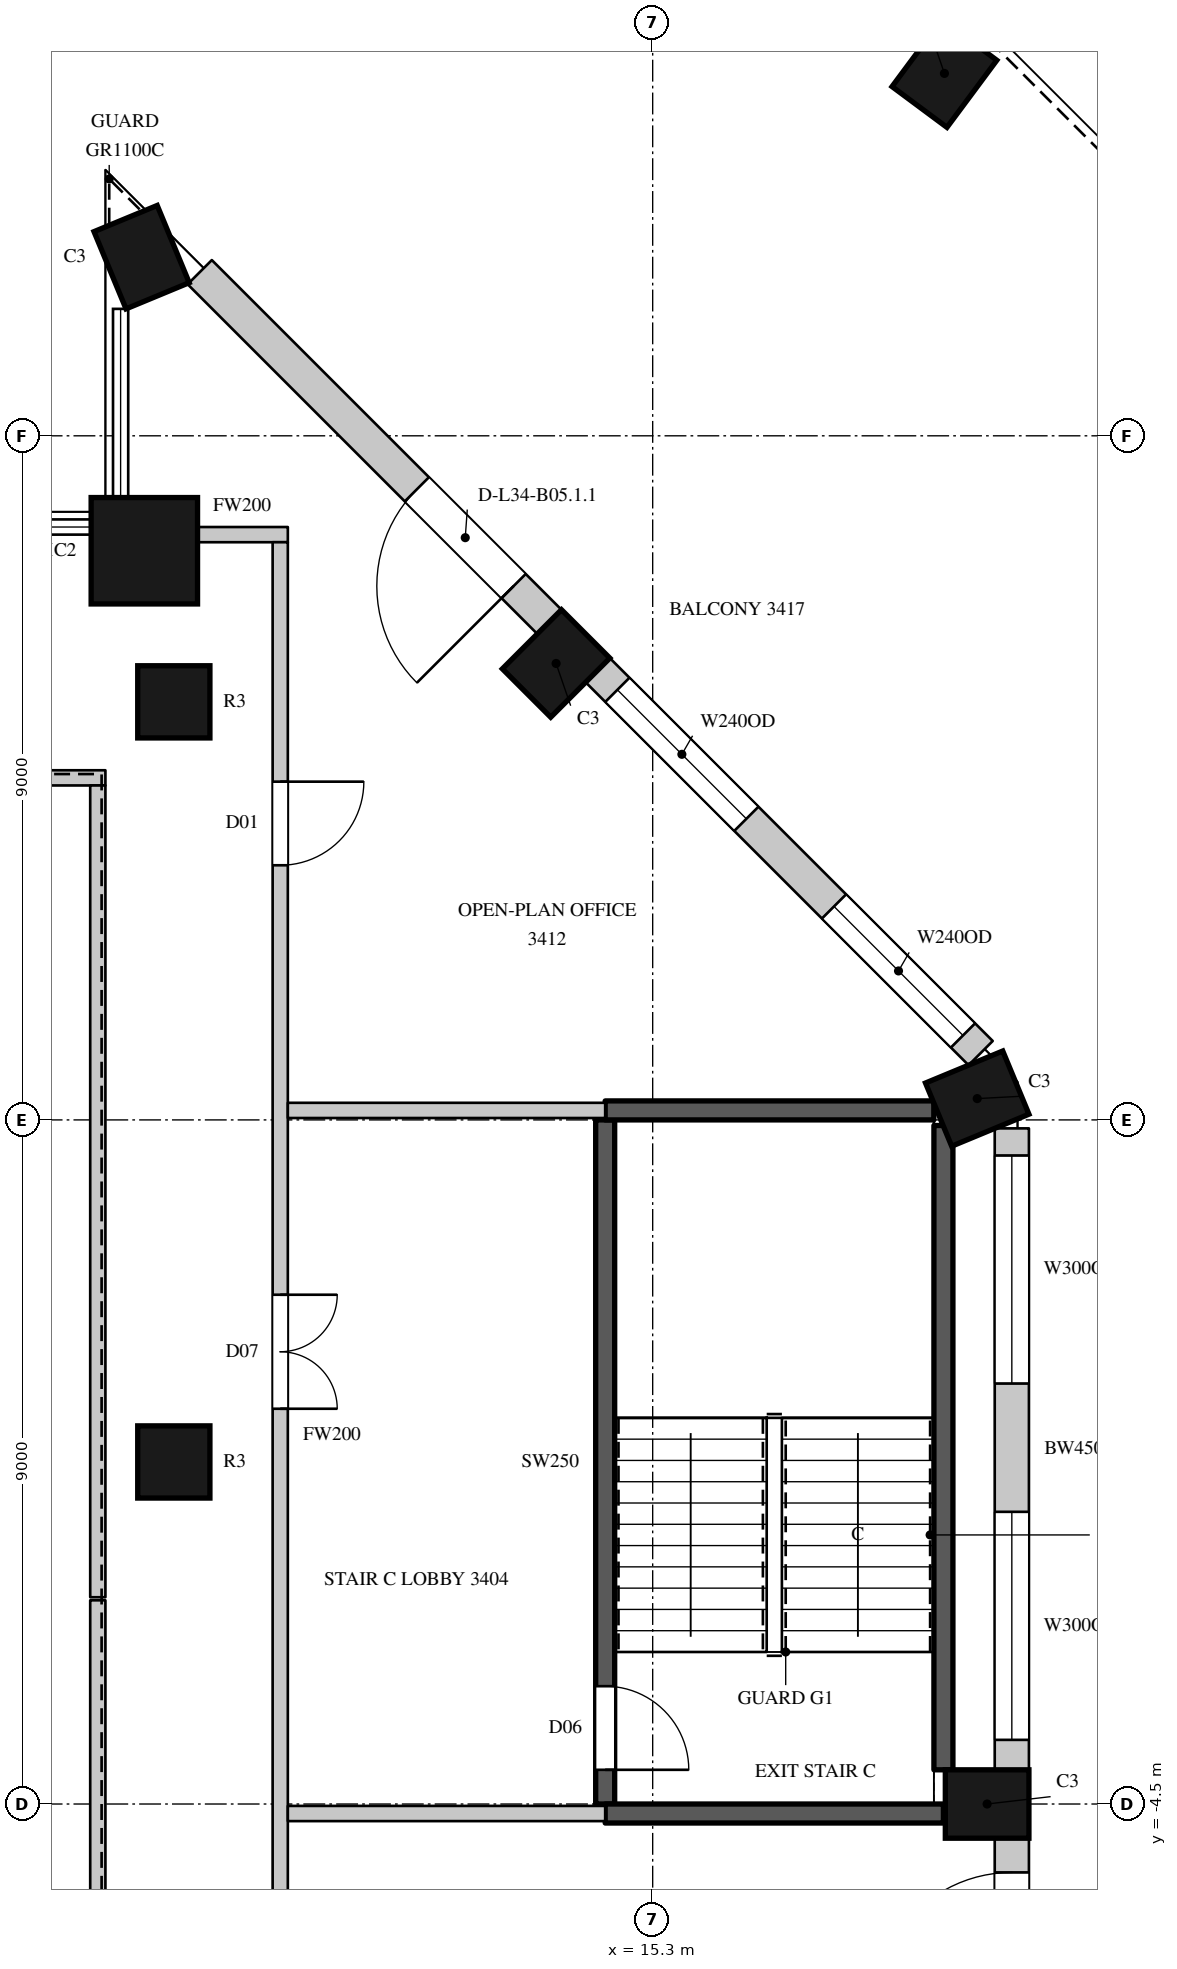
"""IFC4 building model, lengths in metres.
Left out: names, types, materials, properties, quantities, classifications, styles, units other than length and angle.
Written with IfcOpenShell. Run it as: python <this file> out.ifc"""

import sys

from ifc_helpers import new_model, si_unit, direction, frame, frame_2d, origin, origin_2d, place, context, subcontext, project, spatial, rectangle, circle, extrude, element, fill, save


model = new_model("IFC4")
c1 = context("Model", 3, precision=1e-05, world=origin(), true_north=direction((0.0, 1.0)))
c2 = subcontext(c1, "Body", "Model", "MODEL_VIEW")
j1 = project(units=[si_unit("LENGTHUNIT", "METRE"), si_unit("PLANEANGLEUNIT", "RADIAN")], contexts=[c1])
p1 = place(None, origin())
s1 = spatial("IfcSite", under=j1, at=p1, CompositionType="ELEMENT")
p2 = place(p1, origin())
s2 = spatial("IfcBuilding", under=s1, at=p2, CompositionType="ELEMENT")
p3 = place(p2, frame((0.0, 0.0, 160.5)))
s3 = spatial("IfcBuildingStorey", under=s2, at=p3, CompositionType="ELEMENT", Elevation=160.5)
for number, where, z_axis, x_axis in (
    (1, (19.7, -4.5, 0.0), (0.0, 0.0, 1.0), (0.0, 1.0, 0.0)),
    (2, (19.57, 4.78, 0.0), (0.0, 0.0, 1.0), (-0.383, 0.924, 0.0)),
    (3, (14.029, 10.505, 0.0), (0.0, 0.0, 1.0), (-0.707, 0.707, 0.0)),
    (4, (8.576, 15.85, 0.0), (0.0, 0.0, 1.0), (-0.924, -0.383, 0.0)),
):
    element("IfcColumn", number, at=place(p3, frame(where, z_axis=z_axis, x_axis=x_axis)), inside=s3, PredefinedType="COLUMN", context=c2, shape_type="SweptSolid", body=[
        extrude(rectangle(XDim=0.9, YDim=1.1, at=origin_2d()), origin(), (0.0, 0.0, 1.0), 4.1),
    ])
p4 = place(p3, frame((8.612, 11.988, 0.0), z_axis=(0.0, 0.0, 1.0), x_axis=(1.0, 0.0, 0.0)))
e5 = element("IfcColumn", 5, at=p4, inside=s3, PredefinedType="COLUMN", context=c2, shape_type="SweptSolid", body=[
    extrude(circle(Radius=0.7, at=origin_2d()), origin(), (0.0, 0.0, 1.0), 4.1),
])
p5 = place(p3, frame((19.138, 18.268, 0.0), z_axis=(0.0, 0.0, 1.0), x_axis=(-0.802798546114, 0.596250362144, 0.0)))
e6 = element("IfcColumn", 6, at=p5, inside=s3, PredefinedType="COLUMN", context=c2, shape_type="SweptSolid", body=[
    extrude(rectangle(XDim=0.9, YDim=1.1, at=origin_2d()), origin(), (0.0, 0.0, 1.0), 4.1),
])
for number, where, z_axis, x_axis in (
    (7, (9.0, 0.0, 0.0), (0.0, 0.0, 1.0), (1.0, 0.0, 0.0)),
    (8, (9.0, 10.0, 0.0), (0.0, 0.0, 1.0), (1.0, 0.0, 0.0)),
):
    element("IfcColumn", number, at=place(p3, frame(where, z_axis=z_axis, x_axis=x_axis)), inside=s3, PredefinedType="COLUMN", context=c2, shape_type="SweptSolid", body=[
        extrude(circle(Radius=0.475, at=origin_2d()), origin(), (0.0, 0.0, 1.0), 4.1),
    ])
p6 = place(p3, frame((20.025, -11.064, 0.0), z_axis=(0.0, 0.0, 1.0), x_axis=(0.0, 1.0, 0.0)))
e9 = element("IfcWall", 9, at=p6, inside=s3, PredefinedType="SOLIDWALL", context=c2, shape_type="SweptSolid", body=[
    extrude(rectangle(XDim=6.114, YDim=0.45, at=frame_2d((3.057, 0.0))), origin(), (0.0, 0.0, 1.0), 3.8),
])
p7 = place(p6, frame((3.864, 0.0, 0.0)))
e10 = element("IfcOpeningElement", 10, at=p7, cuts=e9, PredefinedType="OPENING", context=c2, shape_type="SweptSolid", body=[
    extrude(rectangle(XDim=1.8, YDim=2.4, at=frame_2d((0.9, 1.2))), frame((0.0, 0.235, 0.0), z_axis=(0.0, -1.0, 0.0), x_axis=(1.0, 0.0, 0.0)), (0.0, 0.0, 1.0), 0.47),
])
p8 = place(p3, frame((20.025, -4.05, 0.0), z_axis=(0.0, 0.0, 1.0), x_axis=(0.0, 1.0, 0.0)))
e11 = element("IfcWall", 11, at=p8, inside=s3, PredefinedType="SOLIDWALL", context=c2, shape_type="SweptSolid", body=[
    extrude(rectangle(XDim=8.439, YDim=0.45, at=frame_2d((4.219, 0.0))), origin(), (0.0, 0.0, 1.0), 3.8),
])
p9 = place(p8, frame((0.394, 0.0, 1.05)))
e12 = element("IfcOpeningElement", 12, at=p9, cuts=e11, PredefinedType="OPENING", context=c2, shape_type="SweptSolid", body=[
    extrude(rectangle(XDim=3.0, YDim=2.4, at=frame_2d((1.5, 1.2))), frame((0.0, 0.235, 0.0), z_axis=(0.0, -1.0, 0.0), x_axis=(1.0, 0.0, 0.0)), (0.0, 0.0, 1.0), 0.47),
])
p10 = place(p8, frame((5.082, 0.0, 1.05)))
e13 = element("IfcOpeningElement", 13, at=p10, cuts=e11, PredefinedType="OPENING", context=c2, shape_type="SweptSolid", body=[
    extrude(rectangle(XDim=3.0, YDim=2.4, at=frame_2d((1.5, 1.2))), frame((0.0, 0.235, 0.0), z_axis=(0.0, -1.0, 0.0), x_axis=(1.0, 0.0, 0.0)), (0.0, 0.0, 1.0), 0.47),
])
p11 = place(p3, frame((19.615, 5.379, 0.0), z_axis=(0.0, 0.0, 1.0), x_axis=(-0.707089646058, 0.7071239159, 0.0)))
e14 = element("IfcWall", 14, at=p11, inside=s3, PredefinedType="SOLIDWALL", context=c2, shape_type="SweptSolid", body=[
    extrude(rectangle(XDim=7.124, YDim=0.45, at=frame_2d((3.562, 0.0))), origin(), (0.0, 0.0, 1.0), 3.8),
])
p12 = place(p11, frame((0.328, 0.0, 1.05)))
e15 = element("IfcOpeningElement", 15, at=p12, cuts=e14, PredefinedType="OPENING", context=c2, shape_type="SweptSolid", body=[
    extrude(rectangle(XDim=2.4, YDim=2.4, at=frame_2d((1.2, 1.2))), frame((0.0, 0.235, 0.0), z_axis=(0.0, -1.0, 0.0), x_axis=(1.0, 0.0, 0.0)), (0.0, 0.0, 1.0), 0.47),
])
p13 = place(p11, frame((4.359, 0.0, 1.05)))
e16 = element("IfcOpeningElement", 16, at=p13, cuts=e14, PredefinedType="OPENING", context=c2, shape_type="SweptSolid", body=[
    extrude(rectangle(XDim=2.4, YDim=2.4, at=frame_2d((1.2, 1.2))), frame((0.0, 0.235, 0.0), z_axis=(0.0, -1.0, 0.0), x_axis=(1.0, 0.0, 0.0)), (0.0, 0.0, 1.0), 0.47),
])
p14 = place(p3, frame((13.941, 11.053, 0.0), z_axis=(0.0, 0.0, 1.0), x_axis=(-0.707106781187, 0.707106781187, 0.0)))
e17 = element("IfcWall", 17, at=p14, inside=s3, PredefinedType="SOLIDWALL", context=c2, shape_type="SweptSolid", body=[
    extrude(rectangle(XDim=6.505, YDim=0.45, at=frame_2d((3.252, 0.0))), origin(), (0.0, 0.0, 1.0), 3.8),
])
p15 = place(p14, frame((0.665, 0.0, 0.0)))
e18 = element("IfcOpeningElement", 18, at=p15, cuts=e17, PredefinedType="OPENING", context=c2, shape_type="SweptSolid", body=[
    extrude(rectangle(XDim=1.8, YDim=2.4, at=frame_2d((0.9, 1.2))), frame((0.0, 0.235, 0.0), z_axis=(0.0, -1.0, 0.0), x_axis=(1.0, 0.0, 0.0)), (0.0, 0.0, 1.0), 0.47),
])
p16 = place(p3, frame((21.1, -5.1, 0.0), z_axis=(0.0, 0.0, 1.0), x_axis=(0.0, 1.0, 0.0)))
e19 = element("IfcWall", 19, at=p16, inside=s3, PredefinedType="SOLIDWALL", context=c2, shape_type="SweptSolid", body=[
    extrude(rectangle(XDim=3.583, YDim=0.45, at=frame_2d((1.792, 0.0))), origin(), (0.0, 0.0, 1.0), 0.6),
])
p17 = place(p3, frame((21.1, -0.617, 0.0), z_axis=(0.0, 0.0, 1.0), x_axis=(0.0, 1.0, 0.0)))
e20 = element("IfcWall", 20, at=p17, inside=s3, PredefinedType="SOLIDWALL", context=c2, shape_type="SweptSolid", body=[
    extrude(rectangle(XDim=2.567, YDim=0.45, at=frame_2d((1.283, 0.0))), origin(), (0.0, 0.0, 1.0), 0.6),
])
p18 = place(p3, frame((18.65, 7.864, 0.0), z_axis=(0.0, 0.0, 1.0), x_axis=(-0.707059037574, 0.707154521576, 0.0)))
e21 = element("IfcWall", 21, at=p18, inside=s3, PredefinedType="SOLIDWALL", context=c2, shape_type="SweptSolid", body=[
    extrude(rectangle(XDim=2.557, YDim=0.45, at=frame_2d((1.278, 0.0))), origin(), (0.0, 0.0, 1.0), 0.6),
])
p19 = place(p3, frame((16.206, 10.308, 0.0), z_axis=(0.0, 0.0, 1.0), x_axis=(-0.707057827829, 0.707155731156, 0.0)))
e22 = element("IfcWall", 22, at=p19, inside=s3, PredefinedType="SOLIDWALL", context=c2, shape_type="SweptSolid", body=[
    extrude(rectangle(XDim=2.494, YDim=0.45, at=frame_2d((1.247, 0.0))), origin(), (0.0, 0.0, 1.0), 0.6),
])
p20 = place(p3, frame((12.251, 14.263, 0.0), z_axis=(0.0, 0.0, 1.0), x_axis=(-0.707039709166, 0.707173846846, 0.0)))
e23 = element("IfcWall", 23, at=p20, inside=s3, PredefinedType="SOLIDWALL", context=c2, shape_type="SweptSolid", body=[
    extrude(rectangle(XDim=1.82, YDim=0.45, at=frame_2d((0.91, 0.0))), origin(), (0.0, 0.0, 1.0), 0.6),
])
p21 = place(p3, frame((-6.1, 9.0, 0.0), z_axis=(0.0, 0.0, 1.0), x_axis=(1.0, 0.0, 0.0)))
e24 = element("IfcWall", 24, at=p21, inside=s3, PredefinedType="PARTITIONING", context=c2, shape_type="SweptSolid", body=[
    extrude(rectangle(XDim=14.2, YDim=0.2, at=frame_2d((7.1, 0.0))), origin(), (0.0, 0.0, 1.0), 3.8),
])
p22 = place(p3, frame((8.0, -8.9, 0.0), z_axis=(0.0, 0.0, 1.0), x_axis=(0.0, 1.0, 0.0)))
e25 = element("IfcWall", 25, at=p22, inside=s3, PredefinedType="PARTITIONING", context=c2, shape_type="SweptSolid", body=[
    extrude(rectangle(XDim=7.08, YDim=0.2, at=frame_2d((3.54, 0.0))), origin(), (0.0, 0.0, 1.0), 3.8),
])
p23 = place(p3, frame((8.0, -1.78, 0.0), z_axis=(0.0, 0.0, 1.0), x_axis=(0.0, 1.0, 0.0)))
e26 = element("IfcWall", 26, at=p23, inside=s3, PredefinedType="PARTITIONING", context=c2, shape_type="SweptSolid", body=[
    extrude(rectangle(XDim=10.68, YDim=0.2, at=frame_2d((5.34, 0.0))), origin(), (0.0, 0.0, 1.0), 3.8),
])
p24 = place(p3, frame((9.296, 12.2, 0.0), z_axis=(0.0, 0.0, 1.0), x_axis=(1.0, 0.0, 0.0)))
e27 = element("IfcWall", 27, at=p24, inside=s3, PredefinedType="PARTITIONING", context=c2, shape_type="SweptSolid", body=[
    extrude(rectangle(XDim=1.204, YDim=0.2, at=frame_2d((0.602, 0.0))), origin(), (0.0, 0.0, 1.0), 3.8),
])
p25 = place(p3, frame((10.4, -11.4, 0.0), z_axis=(0.0, 0.0, 1.0), x_axis=(0.0, 1.0, 0.0)))
e28 = element("IfcWall", 28, at=p25, inside=s3, PredefinedType="PARTITIONING", context=c2, shape_type="SweptSolid", body=[
    extrude(rectangle(XDim=23.5, YDim=0.2, at=frame_2d((11.75, 0.0))), origin(), (0.0, 0.0, 1.0), 3.8),
])
p26 = place(p25, frame((12.1, 0.0, 0.0)))
e29 = element("IfcOpeningElement", 29, at=p26, cuts=e28, PredefinedType="OPENING", context=c2, shape_type="SweptSolid", body=[
    extrude(rectangle(XDim=1.5, YDim=2.4, at=frame_2d((0.75, 1.2))), frame((0.0, 0.11, 0.0), z_axis=(0.0, -1.0, 0.0), x_axis=(1.0, 0.0, 0.0)), (0.0, 0.0, 1.0), 0.22),
])
p27 = place(p25, frame((19.25, 0.0, 0.0)))
e30 = element("IfcOpeningElement", 30, at=p27, cuts=e28, PredefinedType="OPENING", context=c2, shape_type="SweptSolid", body=[
    extrude(rectangle(XDim=1.1, YDim=2.4, at=frame_2d((0.55, 1.2))), frame((0.0, 0.11, 0.0), z_axis=(0.0, -1.0, 0.0), x_axis=(1.0, 0.0, 0.0)), (0.0, 0.0, 1.0), 0.22),
])
p28 = place(p25, frame((4.45, 0.0, 0.0)))
e31 = element("IfcOpeningElement", 31, at=p28, cuts=e28, PredefinedType="OPENING", context=c2, shape_type="SweptSolid", body=[
    extrude(rectangle(XDim=1.1, YDim=2.4, at=frame_2d((0.55, 1.2))), frame((0.0, 0.11, 0.0), z_axis=(0.0, -1.0, 0.0), x_axis=(1.0, 0.0, 0.0)), (0.0, 0.0, 1.0), 0.22),
])
for number, where, z_axis, x_axis in (
    (32, (10.5, -4.625, 0.0), (0.0, 0.0, 1.0), (1.0, 0.0, 0.0)),
    (33, (10.5, 4.625, 0.0), (0.0, 0.0, 1.0), (1.0, 0.0, 0.0)),
):
    element("IfcWall", number, at=place(p3, frame(where, z_axis=z_axis, x_axis=x_axis)), inside=s3, PredefinedType="PARTITIONING", context=c2, shape_type="SweptSolid", body=[
        extrude(rectangle(XDim=4.175, YDim=0.2, at=frame_2d((2.087, 0.0))), origin(), (0.0, 0.0, 1.0), 3.8),
    ])
p29 = place(p3, frame((14.675, -4.5, 0.0), z_axis=(0.0, 0.0, 1.0), x_axis=(0.0, 1.0, 0.0)))
e34 = element("IfcWall", 34, at=p29, inside=s3, PredefinedType="SHEAR", context=c2, shape_type="SweptSolid", body=[
    extrude(rectangle(XDim=9.0, YDim=0.25, at=frame_2d((4.5, 0.0))), origin(), (0.0, 0.0, 1.0), 3.8),
])
p30 = place(p29, frame((0.45, 0.0, 0.0)))
e35 = element("IfcOpeningElement", 35, at=p30, cuts=e34, PredefinedType="OPENING", context=c2, shape_type="SweptSolid", body=[
    extrude(rectangle(XDim=1.1, YDim=2.2, at=frame_2d((0.55, 1.1))), frame((0.0, 0.135, 0.0), z_axis=(0.0, -1.0, 0.0), x_axis=(1.0, 0.0, 0.0)), (0.0, 0.0, 1.0), 0.27),
])
p31 = place(p3, frame((14.675, -4.625, 0.0), z_axis=(0.0, 0.0, 1.0), x_axis=(1.0, 0.0, 0.0)))
e36 = element("IfcWall", 36, at=p31, inside=s3, PredefinedType="SHEAR", context=c2, shape_type="SweptSolid", body=[
    extrude(rectangle(XDim=4.45, YDim=0.25, at=frame_2d((2.225, 0.0))), origin(), (0.0, 0.0, 1.0), 3.8),
])
p32 = place(p3, frame((14.675, 4.625, 0.0), z_axis=(0.0, 0.0, 1.0), x_axis=(1.0, 0.0, 0.0)))
e37 = element("IfcWall", 37, at=p32, inside=s3, PredefinedType="SHEAR", context=c2, shape_type="SweptSolid", body=[
    extrude(rectangle(XDim=4.324, YDim=0.25, at=frame_2d((2.162, 0.0))), origin(), (0.0, 0.0, 1.0), 3.8),
])
p33 = place(p3, frame((19.125, -4.05, 0.0), z_axis=(0.0, 0.0, 1.0), x_axis=(0.0, 1.0, 0.0)))
e38 = element("IfcWall", 38, at=p33, inside=s3, PredefinedType="SHEAR", context=c2, shape_type="SweptSolid", body=[
    extrude(rectangle(XDim=8.477, YDim=0.25, at=frame_2d((4.238, 0.0))), origin(), (0.0, 0.0, 1.0), 3.8),
])
p34 = place(p7, origin())
e39 = element("IfcDoor", 39, at=p34, inside=s3, OperationType="SLIDING_TO_LEFT", PredefinedType="DOOR", context=c2, shape_type="SweptSolid", body=[
    extrude(rectangle(XDim=1.8, YDim=2.4, at=frame_2d((0.9, 1.2))), frame((0.0, 0.13, 0.0), z_axis=(0.0, -1.0, 0.0), x_axis=(1.0, 0.0, 0.0)), (0.0, 0.0, 1.0), 0.05),
])
fill(e10, e39)
p35 = place(p9, origin())
e40 = element("IfcWindow", 40, at=p35, inside=s3, PartitioningType="SINGLE_PANEL", PredefinedType="WINDOW", context=c2, shape_type="SweptSolid", body=[
    extrude(rectangle(XDim=3.0, YDim=2.4, at=frame_2d((1.5, 1.2))), frame((0.0, 0.135, 0.0), z_axis=(0.0, -1.0, 0.0), x_axis=(1.0, 0.0, 0.0)), (0.0, 0.0, 1.0), 0.06),
])
fill(e12, e40)
p36 = place(p10, origin())
e41 = element("IfcWindow", 41, at=p36, inside=s3, PartitioningType="SINGLE_PANEL", PredefinedType="WINDOW", context=c2, shape_type="SweptSolid", body=[
    extrude(rectangle(XDim=3.0, YDim=2.4, at=frame_2d((1.5, 1.2))), frame((0.0, 0.135, 0.0), z_axis=(0.0, -1.0, 0.0), x_axis=(1.0, 0.0, 0.0)), (0.0, 0.0, 1.0), 0.06),
])
fill(e13, e41)
p37 = place(p12, origin())
e42 = element("IfcWindow", 42, at=p37, inside=s3, PartitioningType="SINGLE_PANEL", PredefinedType="WINDOW", context=c2, shape_type="SweptSolid", body=[
    extrude(rectangle(XDim=2.4, YDim=2.4, at=frame_2d((1.2, 1.2))), frame((0.0, 0.135, 0.0), z_axis=(0.0, -1.0, 0.0), x_axis=(1.0, 0.0, 0.0)), (0.0, 0.0, 1.0), 0.06),
])
fill(e15, e42)
p38 = place(p13, origin())
e43 = element("IfcWindow", 43, at=p38, inside=s3, PartitioningType="SINGLE_PANEL", PredefinedType="WINDOW", context=c2, shape_type="SweptSolid", body=[
    extrude(rectangle(XDim=2.4, YDim=2.4, at=frame_2d((1.2, 1.2))), frame((0.0, 0.135, 0.0), z_axis=(0.0, -1.0, 0.0), x_axis=(1.0, 0.0, 0.0)), (0.0, 0.0, 1.0), 0.06),
])
fill(e16, e43)
p39 = place(p15, origin())
e44 = element("IfcDoor", 44, at=p39, inside=s3, OperationType="SLIDING_TO_LEFT", PredefinedType="DOOR", context=c2, shape_type="SweptSolid", body=[
    extrude(rectangle(XDim=1.8, YDim=2.4, at=frame_2d((0.9, 1.2))), frame((0.0, 0.13, 0.0), z_axis=(0.0, -1.0, 0.0), x_axis=(1.0, 0.0, 0.0)), (0.0, 0.0, 1.0), 0.05),
])
fill(e18, e44)
p40 = place(p26, origin())
e45 = element("IfcDoor", 45, at=p40, inside=s3, OperationType="DOUBLE_DOOR_SINGLE_SWING", PredefinedType="DOOR", context=c2, shape_type="SweptSolid", body=[
    extrude(rectangle(XDim=1.5, YDim=2.4, at=frame_2d((0.75, 1.2))), frame((0.0, 0.025, 0.0), z_axis=(0.0, -1.0, 0.0), x_axis=(1.0, 0.0, 0.0)), (0.0, 0.0, 1.0), 0.05),
])
fill(e29, e45)
p41 = place(p27, origin())
e46 = element("IfcDoor", 46, at=p41, inside=s3, OperationType="SINGLE_SWING_LEFT", PredefinedType="DOOR", context=c2, shape_type="SweptSolid", body=[
    extrude(rectangle(XDim=1.1, YDim=2.4, at=frame_2d((0.55, 1.2))), frame((0.0, 0.025, 0.0), z_axis=(0.0, -1.0, 0.0), x_axis=(1.0, 0.0, 0.0)), (0.0, 0.0, 1.0), 0.05),
])
fill(e30, e46)
p42 = place(p30, origin())
e47 = element("IfcDoor", 47, at=p42, inside=s3, OperationType="SINGLE_SWING_RIGHT", PredefinedType="DOOR", context=c2, shape_type="SweptSolid", body=[
    extrude(rectangle(XDim=1.1, YDim=2.2, at=frame_2d((0.55, 1.1))), frame((0.0, 0.025, 0.0), z_axis=(0.0, -1.0, 0.0), x_axis=(1.0, 0.0, 0.0)), (0.0, 0.0, 1.0), 0.05),
])
fill(e35, e47)
save(model, sys.argv[1])
